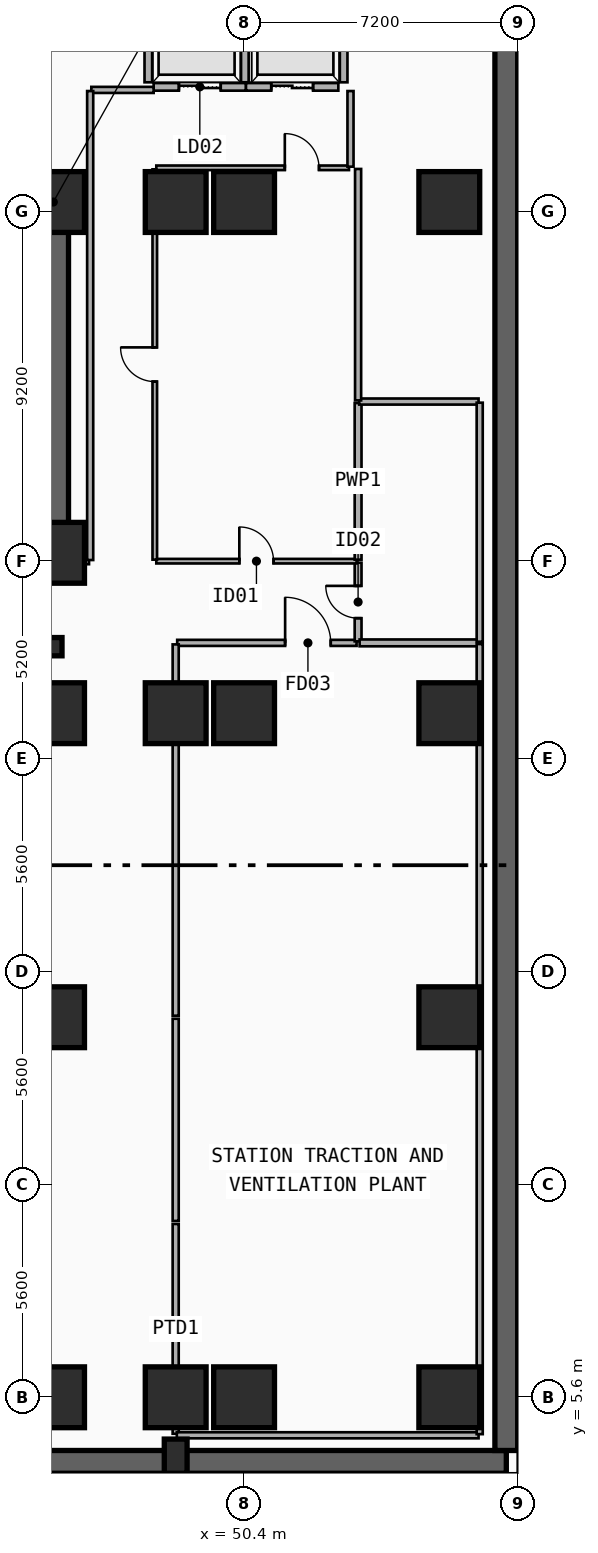
"""IFC4 building model, lengths in metres.
Left out: names, types, materials, properties, quantities, classifications, styles, units other than length and angle.
Written with IfcOpenShell. Run it as: python <this file> out.ifc"""

import sys

from ifc_helpers import new_model, si_unit, direction, frame, frame_2d, origin, origin_2d, place, context, subcontext, project, spatial, rectangle, i_section, extrude, element, fill, save


model = new_model("IFC4")
c1 = context("Model", 3, precision=1e-05, world=origin(), true_north=direction((0.0, 1.0)))
c2 = subcontext(c1, "Body", "Model", "MODEL_VIEW")
j1 = project(units=[si_unit("LENGTHUNIT", "METRE"), si_unit("PLANEANGLEUNIT", "RADIAN")], contexts=[c1])
p1 = place(None, origin())
s1 = spatial("IfcSite", under=j1, at=p1, CompositionType="ELEMENT")
p2 = place(p1, origin())
s2 = spatial("IfcBuilding", under=s1, at=p2, CompositionType="ELEMENT")
p3 = place(p2, frame((0.0, 0.0, -4.4)))
s3 = spatial("IfcBuildingStorey", under=s2, at=p3, CompositionType="ELEMENT", Elevation=-4.4)
p4 = place(p3, frame((0.3, 3.9, 0.0), z_axis=(0.0, 0.0, 1.0), x_axis=(1.0, 0.0, 0.0)))
e1 = element("IfcWall", 1, at=p4, inside=s3, PredefinedType="USERDEFINED", context=c2, shape_type="SweptSolid", body=[
    extrude(rectangle(XDim=57.0, YDim=0.6, at=frame_2d((28.5, 0.0))), origin(), (0.0, 0.0, 1.0), 4.4),
])
p5 = place(p3, frame((57.3, 4.2, 0.0), z_axis=(0.0, 0.0, 1.0), x_axis=(0.0, 1.0, 0.0)))
e2 = element("IfcWall", 2, at=p5, inside=s3, PredefinedType="USERDEFINED", context=c2, shape_type="SweptSolid", body=[
    extrude(rectangle(XDim=40.4, YDim=0.6, at=frame_2d((20.2, 0.0))), origin(), (0.0, 0.0, 1.0), 4.4),
])
p6 = place(p3, frame((12.15, 37.05, 0.0), z_axis=(0.0, 0.0, 1.0), x_axis=(1.0, 0.0, 0.0)))
e3 = element("IfcWall", 3, at=p6, inside=s3, PredefinedType="SHEAR", context=c2, shape_type="SweptSolid", body=[
    extrude(rectangle(XDim=33.23, YDim=0.8, at=frame_2d((16.615, 0.0))), origin(), (0.0, 0.0, 1.0), 4.4),
])
p7 = place(p3, frame((45.38, 27.82, 0.0), z_axis=(0.0, 0.0, 1.0), x_axis=(-1.0, 0.0, 0.0)))
e4 = element("IfcWall", 4, at=p7, inside=s3, PredefinedType="SHEAR", context=c2, shape_type="SweptSolid", body=[
    extrude(rectangle(XDim=12.23, YDim=0.8, at=frame_2d((6.115, 0.0))), origin(), (0.0, 0.0, 1.0), 4.4),
])
p8 = place(p7, frame((9.93, 0.0, 0.0)))
e5 = element("IfcOpeningElement", 5, at=p8, cuts=e4, PredefinedType="OPENING", context=c2, shape_type="SweptSolid", body=[
    extrude(rectangle(XDim=1.1, YDim=2.15, at=frame_2d((0.55, 1.075))), frame((0.0, 0.41, 0.0), z_axis=(0.0, -1.0, 0.0), x_axis=(1.0, 0.0, 0.0)), (0.0, 0.0, 1.0), 0.82),
])
p9 = place(p7, frame((6.23, 0.0, 0.0)))
e6 = element("IfcOpeningElement", 6, at=p9, cuts=e4, PredefinedType="OPENING", context=c2, shape_type="SweptSolid", body=[
    extrude(rectangle(XDim=1.1, YDim=2.15, at=frame_2d((0.55, 1.075))), frame((0.0, 0.41, 0.0), z_axis=(0.0, -1.0, 0.0), x_axis=(1.0, 0.0, 0.0)), (0.0, 0.0, 1.0), 0.82),
])
p10 = place(p3, frame((45.38, 28.22, 0.0), z_axis=(0.0, 0.0, 1.0), x_axis=(0.0, 1.0, 0.0)))
e7 = element("IfcWall", 7, at=p10, inside=s3, PredefinedType="SHEAR", context=c2, shape_type="SweptSolid", body=[
    extrude(rectangle(XDim=8.43, YDim=0.8, at=frame_2d((4.215, 0.0))), origin(), (0.0, 0.0, 1.0), 4.4),
])
for number, where, z_axis, x_axis in (
    (8, (45.4, 27.82, 0.0), (0.0, 0.0, 1.0), (1.0, 0.0, 0.0)),
    (9, (45.4, 37.05, 0.0), (0.0, 0.0, 1.0), (1.0, 0.0, 0.0)),
):
    element("IfcColumn", number, at=place(p3, frame(where, z_axis=z_axis, x_axis=x_axis)), inside=s3, PredefinedType="COLUMN", context=c2, shape_type="SweptSolid", body=[
        extrude(rectangle(XDim=1.6, YDim=1.6, at=origin_2d()), origin(), (0.0, 0.0, 1.0), 4.4),
    ])
p11 = place(p3, frame((45.4, 25.35, 0.0), z_axis=(0.0, 0.0, 1.0), x_axis=(1.0, 0.0, 0.0)))
e10 = element("IfcColumn", 10, at=p11, inside=s3, PredefinedType="COLUMN", context=c2, shape_type="SweptSolid", body=[
    extrude(i_section(OverallWidth=0.418, OverallDepth=0.481, WebThickness=0.043, FlangeThickness=0.068, FilletRadius=0.015, at=origin_2d()), origin(), (0.0, 0.0, 1.0), 4.4),
])
for number, where, z_axis, x_axis in (
    (11, (45.4, 5.6, 0.0), (0.0, 0.0, 1.0), (1.0, 0.0, 0.0)),
    (12, (45.4, 15.6, 0.0), (0.0, 0.0, 1.0), (1.0, 0.0, 0.0)),
    (13, (45.4, 23.6, 0.0), (0.0, 0.0, 1.0), (1.0, 0.0, 0.0)),
    (14, (48.6, 5.6, 0.0), (0.0, 0.0, 1.0), (1.0, 0.0, 0.0)),
    (15, (48.6, 23.6, 0.0), (0.0, 0.0, 1.0), (1.0, 0.0, 0.0)),
    (16, (48.6, 37.05, 0.0), (0.0, 0.0, 1.0), (1.0, 0.0, 0.0)),
    (17, (50.4, 5.6, 0.0), (0.0, 0.0, 1.0), (1.0, 0.0, 0.0)),
    (18, (50.4, 23.6, 0.0), (0.0, 0.0, 1.0), (1.0, 0.0, 0.0)),
    (19, (50.4, 37.05, 0.0), (0.0, 0.0, 1.0), (1.0, 0.0, 0.0)),
    (20, (55.8, 5.6, 0.0), (0.0, 0.0, 1.0), (1.0, 0.0, 0.0)),
    (21, (55.8, 15.6, 0.0), (0.0, 0.0, 1.0), (1.0, 0.0, 0.0)),
    (22, (55.8, 23.6, 0.0), (0.0, 0.0, 1.0), (1.0, 0.0, 0.0)),
    (23, (55.8, 37.05, 0.0), (0.0, 0.0, 1.0), (1.0, 0.0, 0.0)),
):
    element("IfcColumn", number, at=place(p3, frame(where, z_axis=z_axis, x_axis=x_axis)), inside=s3, PredefinedType="COLUMN", context=c2, shape_type="SweptSolid", body=[
        extrude(rectangle(XDim=1.6, YDim=1.6, at=origin_2d()), origin(), (0.0, 0.0, 1.0), 4.4),
    ])
p12 = place(p3, frame((48.6, 4.05, 0.0), z_axis=(0.0, 0.0, 1.0), x_axis=(1.0, 0.0, 0.0)))
e24 = element("IfcColumn", 24, at=p12, inside=s3, PredefinedType="PILASTER", context=c2, shape_type="SweptSolid", body=[
    extrude(rectangle(XDim=0.6, YDim=0.9, at=origin_2d()), origin(), (0.0, 0.0, 1.0), 4.4),
])
p13 = place(p3, frame((48.02, 40.08, 0.0), z_axis=(0.0, 0.0, 1.0), x_axis=(1.0, 0.0, 0.0)))
e25 = element("IfcWall", 25, at=p13, inside=s3, PredefinedType="PARTITIONING", context=c2, shape_type="SweptSolid", body=[
    extrude(rectangle(XDim=2.43, YDim=0.2, at=frame_2d((1.215, 0.0))), origin(), (0.0, 0.0, 1.0), 4.05),
])
p14 = place(p13, frame((0.665, 0.0, 0.0)))
e26 = element("IfcOpeningElement", 26, at=p14, cuts=e25, PredefinedType="OPENING", context=c2, shape_type="SweptSolid", body=[
    extrude(rectangle(XDim=1.1, YDim=2.15, at=frame_2d((0.55, 1.075))), frame((0.0, 0.11, 0.0), z_axis=(0.0, -1.0, 0.0), x_axis=(1.0, 0.0, 0.0)), (0.0, 0.0, 1.0), 0.22),
])
for number, where, z_axis, x_axis in (
    (27, (47.88, 40.2, 0.0), (0.0, 0.0, 1.0), (0.0, 1.0, 0.0)),
    (28, (50.42, 40.2, 0.0), (0.0, 0.0, 1.0), (0.0, 1.0, 0.0)),
):
    element("IfcWall", number, at=place(p3, frame(where, z_axis=z_axis, x_axis=x_axis)), inside=s3, PredefinedType="PARTITIONING", context=c2, shape_type="SweptSolid", body=[
        extrude(rectangle(XDim=2.6, YDim=0.2, at=frame_2d((1.3, 0.0))), origin(), (0.0, 0.0, 1.0), 4.05),
    ])
p15 = place(p3, frame((50.45, 40.08, 0.0), z_axis=(0.0, 0.0, 1.0), x_axis=(1.0, 0.0, 0.0)))
e29 = element("IfcWall", 29, at=p15, inside=s3, PredefinedType="PARTITIONING", context=c2, shape_type="SweptSolid", body=[
    extrude(rectangle(XDim=2.43, YDim=0.2, at=frame_2d((1.215, 0.0))), origin(), (0.0, 0.0, 1.0), 4.05),
])
p16 = place(p15, frame((0.665, 0.0, 0.0)))
e30 = element("IfcOpeningElement", 30, at=p16, cuts=e29, PredefinedType="OPENING", context=c2, shape_type="SweptSolid", body=[
    extrude(rectangle(XDim=1.1, YDim=2.15, at=frame_2d((0.55, 1.075))), frame((0.0, 0.11, 0.0), z_axis=(0.0, -1.0, 0.0), x_axis=(1.0, 0.0, 0.0)), (0.0, 0.0, 1.0), 0.22),
])
p17 = place(p3, frame((53.02, 40.2, 0.0), z_axis=(0.0, 0.0, 1.0), x_axis=(0.0, 1.0, 0.0)))
e31 = element("IfcWall", 31, at=p17, inside=s3, PredefinedType="PARTITIONING", context=c2, shape_type="SweptSolid", body=[
    extrude(rectangle(XDim=2.6, YDim=0.2, at=frame_2d((1.3, 0.0))), origin(), (0.0, 0.0, 1.0), 4.05),
])
p18 = place(p3, frame((48.64, 25.45, 0.0), z_axis=(0.0, 0.0, 1.0), x_axis=(1.0, 0.0, 0.0)))
e32 = element("IfcWall", 32, at=p18, inside=s3, PredefinedType="PARTITIONING", context=c2, shape_type="SweptSolid", body=[
    extrude(rectangle(XDim=4.72, YDim=0.16, at=frame_2d((2.36, 0.0))), origin(), (0.0, 0.0, 1.0), 4.05),
])
p19 = place(p18, frame((2.84, 0.0, 0.0)))
e33 = element("IfcOpeningElement", 33, at=p19, cuts=e32, PredefinedType="OPENING", context=c2, shape_type="SweptSolid", body=[
    extrude(rectangle(XDim=1.2, YDim=2.15, at=frame_2d((0.6, 1.075))), frame((0.0, 0.09, 0.0), z_axis=(0.0, -1.0, 0.0), x_axis=(1.0, 0.0, 0.0)), (0.0, 0.0, 1.0), 0.18),
])
p20 = place(p3, frame((53.4, 25.49, 0.0), z_axis=(0.0, 0.0, 1.0), x_axis=(0.0, 1.0, 0.0)))
e34 = element("IfcWall", 34, at=p20, inside=s3, PredefinedType="PLUMBINGWALL", context=c2, shape_type="SweptSolid", body=[
    extrude(rectangle(XDim=2.07, YDim=0.18, at=frame_2d((1.035, 0.0))), origin(), (0.0, 0.0, 1.0), 4.05),
])
p21 = place(p20, frame((0.61, 0.0, 0.0)))
e35 = element("IfcOpeningElement", 35, at=p21, cuts=e34, PredefinedType="OPENING", context=c2, shape_type="SweptSolid", body=[
    extrude(rectangle(XDim=0.85, YDim=2.1, at=frame_2d((0.425, 1.05))), frame((0.0, 0.1, 0.0), z_axis=(0.0, -1.0, 0.0), x_axis=(1.0, 0.0, 0.0)), (0.0, 0.0, 1.0), 0.2),
])
p22 = place(p3, frame((48.09, 27.6, 0.0), z_axis=(0.0, 0.0, 1.0), x_axis=(1.0, 0.0, 0.0)))
e36 = element("IfcWall", 36, at=p22, inside=s3, PredefinedType="PARTITIONING", context=c2, shape_type="SweptSolid", body=[
    extrude(rectangle(XDim=5.27, YDim=0.12, at=frame_2d((2.635, 0.0))), origin(), (0.0, 0.0, 1.0), 4.05),
])
p23 = place(p22, frame((2.185, 0.0, 0.0)))
e37 = element("IfcOpeningElement", 37, at=p23, cuts=e36, PredefinedType="OPENING", context=c2, shape_type="SweptSolid", body=[
    extrude(rectangle(XDim=0.9, YDim=2.1, at=frame_2d((0.45, 1.05))), frame((0.0, 0.07, 0.0), z_axis=(0.0, -1.0, 0.0), x_axis=(1.0, 0.0, 0.0)), (0.0, 0.0, 1.0), 0.14),
])
p24 = place(p3, frame((48.05, 27.64, 0.0), z_axis=(0.0, 0.0, 1.0), x_axis=(0.0, 1.0, 0.0)))
e38 = element("IfcWall", 38, at=p24, inside=s3, PredefinedType="PARTITIONING", context=c2, shape_type="SweptSolid", body=[
    extrude(rectangle(XDim=10.27, YDim=0.12, at=frame_2d((5.135, 0.0))), origin(), (0.0, 0.0, 1.0), 4.05),
])
p25 = place(p24, frame((4.685, 0.0, 0.0)))
e39 = element("IfcOpeningElement", 39, at=p25, cuts=e38, PredefinedType="OPENING", context=c2, shape_type="SweptSolid", body=[
    extrude(rectangle(XDim=0.9, YDim=2.1, at=frame_2d((0.45, 1.05))), frame((0.0, 0.07, 0.0), z_axis=(0.0, -1.0, 0.0), x_axis=(1.0, 0.0, 0.0)), (0.0, 0.0, 1.0), 0.14),
])
p26 = place(p3, frame((48.09, 37.95, 0.0), z_axis=(0.0, 0.0, 1.0), x_axis=(1.0, 0.0, 0.0)))
e40 = element("IfcWall", 40, at=p26, inside=s3, PredefinedType="PARTITIONING", context=c2, shape_type="SweptSolid", body=[
    extrude(rectangle(XDim=5.07, YDim=0.12, at=frame_2d((2.535, 0.0))), origin(), (0.0, 0.0, 1.0), 4.05),
])
p27 = place(p26, frame((3.382, 0.0, 0.0)))
e41 = element("IfcOpeningElement", 41, at=p27, cuts=e40, PredefinedType="OPENING", context=c2, shape_type="SweptSolid", body=[
    extrude(rectangle(XDim=0.9, YDim=2.1, at=frame_2d((0.45, 1.05))), frame((0.0, 0.07, 0.0), z_axis=(0.0, -1.0, 0.0), x_axis=(1.0, 0.0, 0.0)), (0.0, 0.0, 1.0), 0.14),
])
p28 = place(p3, frame((48.6, 4.64, 0.0), z_axis=(0.0, 0.0, 1.0), x_axis=(0.0, 1.0, 0.0)))
e42 = element("IfcWall", 42, at=p28, inside=s3, PredefinedType="PARTITIONING", context=c2, shape_type="SweptSolid", body=[
    extrude(rectangle(XDim=5.52, YDim=0.16, at=frame_2d((2.76, 0.0))), origin(), (0.0, 0.0, 1.0), 2.63),
])
p29 = place(p3, frame((48.6, 10.24, 0.0), z_axis=(0.0, 0.0, 1.0), x_axis=(0.0, 1.0, 0.0)))
e43 = element("IfcWall", 43, at=p29, inside=s3, PredefinedType="PARTITIONING", context=c2, shape_type="SweptSolid", body=[
    extrude(rectangle(XDim=5.32, YDim=0.16, at=frame_2d((2.66, 0.0))), origin(), (0.0, 0.0, 1.0), 3.022),
])
p30 = place(p3, frame((48.6, 15.64, 0.0), z_axis=(0.0, 0.0, 1.0), x_axis=(0.0, 1.0, 0.0)))
e44 = element("IfcWall", 44, at=p30, inside=s3, PredefinedType="PARTITIONING", context=c2, shape_type="SweptSolid", body=[
    extrude(rectangle(XDim=9.77, YDim=0.16, at=frame_2d((4.885, 0.0))), origin(), (0.0, 0.0, 1.0), 2.63),
])
p31 = place(p3, frame((53.44, 25.45, 0.0), z_axis=(0.0, 0.0, 1.0), x_axis=(1.0, 0.0, 0.0)))
e45 = element("IfcWall", 45, at=p31, inside=s3, PredefinedType="PLUMBINGWALL", context=c2, shape_type="SweptSolid", body=[
    extrude(rectangle(XDim=3.12, YDim=0.18, at=frame_2d((1.56, 0.0))), origin(), (0.0, 0.0, 1.0), 4.05),
])
p32 = place(p3, frame((53.4, 27.64, 0.0), z_axis=(0.0, 0.0, 1.0), x_axis=(0.0, 1.0, 0.0)))
e46 = element("IfcWall", 46, at=p32, inside=s3, PredefinedType="PLUMBINGWALL", context=c2, shape_type="SweptSolid", body=[
    extrude(rectangle(XDim=4.12, YDim=0.18, at=frame_2d((2.06, 0.0))), origin(), (0.0, 0.0, 1.0), 4.05),
])
p33 = place(p3, frame((45.41, 27.6, 0.0), z_axis=(0.0, 0.0, 1.0), x_axis=(1.0, 0.0, 0.0)))
e47 = element("IfcWall", 47, at=p33, inside=s3, PredefinedType="PARTITIONING", context=c2, shape_type="SweptSolid", body=[
    extrude(rectangle(XDim=0.91, YDim=0.16, at=frame_2d((0.455, 0.0))), origin(), (0.0, 0.0, 1.0), 3.022),
])
p34 = place(p3, frame((46.38, 40.0, 0.0), z_axis=(0.0, 0.0, 1.0), x_axis=(1.0, 0.0, 0.0)))
e48 = element("IfcWall", 48, at=p34, inside=s3, PredefinedType="PARTITIONING", context=c2, shape_type="SweptSolid", body=[
    extrude(rectangle(XDim=1.64, YDim=0.16, at=frame_2d((0.82, 0.0))), origin(), (0.0, 0.0, 1.0), 4.05),
])
p35 = place(p3, frame((46.35, 27.63, 0.0), z_axis=(0.0, 0.0, 1.0), x_axis=(0.0, 1.0, 0.0)))
e49 = element("IfcWall", 49, at=p35, inside=s3, PredefinedType="PARTITIONING", context=c2, shape_type="SweptSolid", body=[
    extrude(rectangle(XDim=12.34, YDim=0.16, at=frame_2d((6.17, 0.0))), origin(), (0.0, 0.0, 1.0), 4.05),
])
p36 = place(p3, frame((53.2, 37.98, 0.0), z_axis=(0.0, 0.0, 1.0), x_axis=(0.0, 1.0, 0.0)))
e50 = element("IfcWall", 50, at=p36, inside=s3, PredefinedType="PARTITIONING", context=c2, shape_type="SweptSolid", body=[
    extrude(rectangle(XDim=1.99, YDim=0.16, at=frame_2d((0.995, 0.0))), origin(), (0.0, 0.0, 1.0), 4.05),
])
p37 = place(p3, frame((48.63, 4.6, 0.0), z_axis=(0.0, 0.0, 1.0), x_axis=(1.0, 0.0, 0.0)))
e51 = element("IfcWall", 51, at=p37, inside=s3, PredefinedType="PARTITIONING", context=c2, shape_type="SweptSolid", body=[
    extrude(rectangle(XDim=7.94, YDim=0.16, at=frame_2d((3.97, 0.0))), origin(), (0.0, 0.0, 1.0), 4.05),
])
p38 = place(p3, frame((56.6, 4.63, 0.0), z_axis=(0.0, 0.0, 1.0), x_axis=(0.0, 1.0, 0.0)))
e52 = element("IfcWall", 52, at=p38, inside=s3, PredefinedType="PARTITIONING", context=c2, shape_type="SweptSolid", body=[
    extrude(rectangle(XDim=20.79, YDim=0.16, at=frame_2d((10.395, 0.0))), origin(), (0.0, 0.0, 1.0), 4.05),
])
p39 = place(p3, frame((53.43, 31.8, 0.0), z_axis=(0.0, 0.0, 1.0), x_axis=(1.0, 0.0, 0.0)))
e53 = element("IfcWall", 53, at=p39, inside=s3, PredefinedType="PARTITIONING", context=c2, shape_type="SweptSolid", body=[
    extrude(rectangle(XDim=3.14, YDim=0.16, at=frame_2d((1.57, 0.0))), origin(), (0.0, 0.0, 1.0), 4.05),
])
p40 = place(p3, frame((56.6, 25.48, 0.0), z_axis=(0.0, 0.0, 1.0), x_axis=(0.0, 1.0, 0.0)))
e54 = element("IfcWall", 54, at=p40, inside=s3, PredefinedType="PARTITIONING", context=c2, shape_type="SweptSolid", body=[
    extrude(rectangle(XDim=6.29, YDim=0.16, at=frame_2d((3.145, 0.0))), origin(), (0.0, 0.0, 1.0), 4.05),
])
p41 = place(p3, frame((53.4, 31.83, 0.0), z_axis=(0.0, 0.0, 1.0), x_axis=(0.0, 1.0, 0.0)))
e55 = element("IfcWall", 55, at=p41, inside=s3, PredefinedType="PARTITIONING", context=c2, shape_type="SweptSolid", body=[
    extrude(rectangle(XDim=6.09, YDim=0.16, at=frame_2d((3.045, 0.0))), origin(), (0.0, 0.0, 1.0), 4.05),
])
p42 = place(p14, origin())
e56 = element("IfcDoor", 56, at=p42, inside=s3, OperationType="DOUBLE_DOOR_SLIDING", PredefinedType="DOOR", context=c2, shape_type="SweptSolid", body=[
    extrude(rectangle(XDim=1.1, YDim=2.15, at=frame_2d((0.55, 1.075))), frame((0.0, 0.025, 0.0), z_axis=(0.0, -1.0, 0.0), x_axis=(1.0, 0.0, 0.0)), (0.0, 0.0, 1.0), 0.05),
])
fill(e26, e56)
p43 = place(p16, origin())
e57 = element("IfcDoor", 57, at=p43, inside=s3, OperationType="DOUBLE_DOOR_SLIDING", PredefinedType="DOOR", context=c2, shape_type="SweptSolid", body=[
    extrude(rectangle(XDim=1.1, YDim=2.15, at=frame_2d((0.55, 1.075))), frame((0.0, 0.025, 0.0), z_axis=(0.0, -1.0, 0.0), x_axis=(1.0, 0.0, 0.0)), (0.0, 0.0, 1.0), 0.05),
])
fill(e30, e57)
p44 = place(p19, origin())
e58 = element("IfcDoor", 58, at=p44, inside=s3, OperationType="SINGLE_SWING_LEFT", PredefinedType="DOOR", context=c2, shape_type="SweptSolid", body=[
    extrude(rectangle(XDim=1.2, YDim=2.15, at=frame_2d((0.6, 1.075))), frame((0.0, 0.025, 0.0), z_axis=(0.0, -1.0, 0.0), x_axis=(1.0, 0.0, 0.0)), (0.0, 0.0, 1.0), 0.05),
])
fill(e33, e58)
p45 = place(p21, origin())
e59 = element("IfcDoor", 59, at=p45, inside=s3, OperationType="SINGLE_SWING_RIGHT", PredefinedType="DOOR", context=c2, shape_type="SweptSolid", body=[
    extrude(rectangle(XDim=0.85, YDim=2.1, at=frame_2d((0.425, 1.05))), frame((0.0, 0.025, 0.0), z_axis=(0.0, -1.0, 0.0), x_axis=(1.0, 0.0, 0.0)), (0.0, 0.0, 1.0), 0.05),
])
fill(e35, e59)
p46 = place(p23, origin())
e60 = element("IfcDoor", 60, at=p46, inside=s3, OperationType="SINGLE_SWING_LEFT", PredefinedType="DOOR", context=c2, shape_type="SweptSolid", body=[
    extrude(rectangle(XDim=0.9, YDim=2.1, at=frame_2d((0.45, 1.05))), frame((0.0, 0.025, 0.0), z_axis=(0.0, -1.0, 0.0), x_axis=(1.0, 0.0, 0.0)), (0.0, 0.0, 1.0), 0.05),
])
fill(e37, e60)
p47 = place(p25, origin())
e61 = element("IfcDoor", 61, at=p47, inside=s3, OperationType="SINGLE_SWING_RIGHT", PredefinedType="DOOR", context=c2, shape_type="SweptSolid", body=[
    extrude(rectangle(XDim=0.9, YDim=2.1, at=frame_2d((0.45, 1.05))), frame((0.0, 0.025, 0.0), z_axis=(0.0, -1.0, 0.0), x_axis=(1.0, 0.0, 0.0)), (0.0, 0.0, 1.0), 0.05),
])
fill(e39, e61)
p48 = place(p27, origin())
e62 = element("IfcDoor", 62, at=p48, inside=s3, OperationType="SINGLE_SWING_LEFT", PredefinedType="DOOR", context=c2, shape_type="SweptSolid", body=[
    extrude(rectangle(XDim=0.9, YDim=2.1, at=frame_2d((0.45, 1.05))), frame((0.0, 0.025, 0.0), z_axis=(0.0, -1.0, 0.0), x_axis=(1.0, 0.0, 0.0)), (0.0, 0.0, 1.0), 0.05),
])
fill(e41, e62)
save(model, sys.argv[1])
